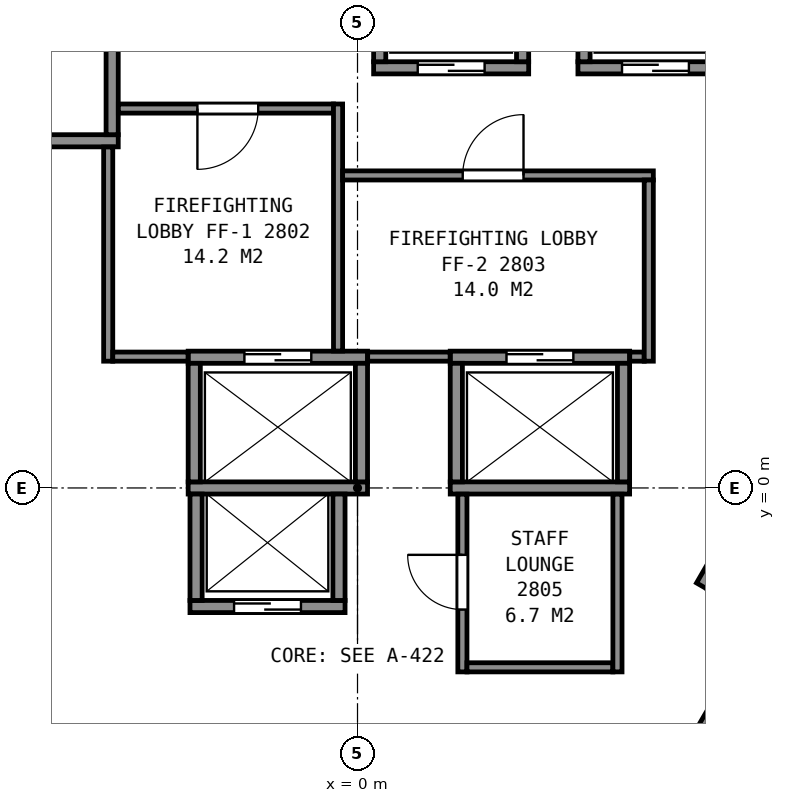
"""IFC4 building model, lengths in metres.
Left out: names, types, materials, properties, quantities, classifications, styles, units other than length and angle.
Written with IfcOpenShell. Run it as: python <this file> out.ifc"""

import sys

from ifc_helpers import new_model, si_unit, direction, frame, frame_2d, origin, place, context, subcontext, project, spatial, rectangle, extrude, element, fill, save


model = new_model("IFC4")
c1 = context("Model", 3, precision=1e-05, world=origin(), true_north=direction((0.0, 1.0)))
c2 = subcontext(c1, "Body", "Model", "MODEL_VIEW")
j1 = project(units=[si_unit("LENGTHUNIT", "METRE"), si_unit("PLANEANGLEUNIT", "RADIAN")], contexts=[c1])
p1 = place(None, origin())
s1 = spatial("IfcSite", under=j1, at=p1, CompositionType="ELEMENT")
p2 = place(p1, origin())
s2 = spatial("IfcBuilding", under=s1, at=p2, CompositionType="ELEMENT")
p3 = place(p2, frame((0.0, 0.0, 118.0)))
s3 = spatial("IfcBuildingStorey", under=s2, at=p3, CompositionType="ELEMENT", Elevation=118.0)
p4 = place(p3, frame((-2.755, -1.95, 0.0), z_axis=(0.0, 0.0, 1.0), x_axis=(1.0, 0.0, 0.0)))
e1 = element("IfcWall", 1, at=p4, inside=s3, PredefinedType="PARTITIONING", context=c2, shape_type="SweptSolid", body=[
    extrude(rectangle(XDim=2.55, YDim=0.2, at=frame_2d((1.275, 0.0))), origin(), (0.0, 0.0, 1.0), 3.6),
])
p5 = place(p4, frame((0.725, 0.0, 0.0)))
e2 = element("IfcOpeningElement", 2, at=p5, cuts=e1, PredefinedType="OPENING", context=c2, shape_type="SweptSolid", body=[
    extrude(rectangle(XDim=1.1, YDim=2.1, at=frame_2d((0.55, 1.05))), frame((0.0, 0.11, 0.0), z_axis=(0.0, -1.0, 0.0), x_axis=(1.0, 0.0, 0.0)), (0.0, 0.0, 1.0), 0.22),
])
p6 = place(p3, frame((-2.785, 0.0, 0.0), z_axis=(0.0, 0.0, 1.0), x_axis=(1.0, 0.0, 0.0)))
e3 = element("IfcWall", 3, at=p6, inside=s3, PredefinedType="PARTITIONING", context=c2, shape_type="SweptSolid", body=[
    extrude(rectangle(XDim=2.95, YDim=0.2, at=frame_2d((1.475, 0.0))), origin(), (0.0, 0.0, 1.0), 3.6),
])
p7 = place(p3, frame((1.525, 0.0, 0.0), z_axis=(0.0, 0.0, 1.0), x_axis=(1.0, 0.0, 0.0)))
e4 = element("IfcWall", 4, at=p7, inside=s3, PredefinedType="PARTITIONING", context=c2, shape_type="SweptSolid", body=[
    extrude(rectangle(XDim=2.95, YDim=0.2, at=frame_2d((1.475, 0.0))), origin(), (0.0, 0.0, 1.0), 3.6),
])
p8 = place(p3, frame((-2.785, 2.15, 0.0), z_axis=(0.0, 0.0, 1.0), x_axis=(1.0, 0.0, 0.0)))
e5 = element("IfcWall", 5, at=p8, inside=s3, PredefinedType="PARTITIONING", context=c2, shape_type="SweptSolid", body=[
    extrude(rectangle(XDim=2.95, YDim=0.2, at=frame_2d((1.475, 0.0))), origin(), (0.0, 0.0, 1.0), 3.6),
])
p9 = place(p8, frame((0.925, 0.0, 0.0)))
e6 = element("IfcOpeningElement", 6, at=p9, cuts=e5, PredefinedType="OPENING", context=c2, shape_type="SweptSolid", body=[
    extrude(rectangle(XDim=1.1, YDim=2.1, at=frame_2d((0.55, 1.05))), frame((0.0, 0.11, 0.0), z_axis=(0.0, -1.0, 0.0), x_axis=(1.0, 0.0, 0.0)), (0.0, 0.0, 1.0), 0.22),
])
p10 = place(p3, frame((1.525, 2.15, 0.0), z_axis=(0.0, 0.0, 1.0), x_axis=(1.0, 0.0, 0.0)))
e7 = element("IfcWall", 7, at=p10, inside=s3, PredefinedType="PARTITIONING", context=c2, shape_type="SweptSolid", body=[
    extrude(rectangle(XDim=2.95, YDim=0.2, at=frame_2d((1.475, 0.0))), origin(), (0.0, 0.0, 1.0), 3.6),
])
p11 = place(p10, frame((0.925, 0.0, 0.0)))
e8 = element("IfcOpeningElement", 8, at=p11, cuts=e7, PredefinedType="OPENING", context=c2, shape_type="SweptSolid", body=[
    extrude(rectangle(XDim=1.1, YDim=2.1, at=frame_2d((0.55, 1.05))), frame((0.0, 0.11, 0.0), z_axis=(0.0, -1.0, 0.0), x_axis=(1.0, 0.0, 0.0)), (0.0, 0.0, 1.0), 0.22),
])
p12 = place(p3, frame((-6.285, 5.71, 0.0), z_axis=(0.0, 0.0, 1.0), x_axis=(1.0, 0.0, 0.0)))
e9 = element("IfcWall", 9, at=p12, inside=s3, PredefinedType="PARTITIONING", context=c2, shape_type="SweptSolid", body=[
    extrude(rectangle(XDim=2.35, YDim=0.2, at=frame_2d((1.175, 0.0))), origin(), (0.0, 0.0, 1.0), 3.6),
])
p13 = place(p3, frame((0.265, 6.91, 0.0), z_axis=(0.0, 0.0, 1.0), x_axis=(1.0, 0.0, 0.0)))
e10 = element("IfcWall", 10, at=p13, inside=s3, PredefinedType="PARTITIONING", context=c2, shape_type="SweptSolid", body=[
    extrude(rectangle(XDim=2.55, YDim=0.2, at=frame_2d((1.275, 0.0))), origin(), (0.0, 0.0, 1.0), 3.6),
])
p14 = place(p13, frame((0.725, 0.0, 0.0)))
e11 = element("IfcOpeningElement", 11, at=p14, cuts=e10, PredefinedType="OPENING", context=c2, shape_type="SweptSolid", body=[
    extrude(rectangle(XDim=1.1, YDim=2.1, at=frame_2d((0.55, 1.05))), frame((0.0, 0.11, 0.0), z_axis=(0.0, -1.0, 0.0), x_axis=(1.0, 0.0, 0.0)), (0.0, 0.0, 1.0), 0.22),
])
p15 = place(p3, frame((3.625, 6.91, 0.0), z_axis=(0.0, 0.0, 1.0), x_axis=(1.0, 0.0, 0.0)))
e12 = element("IfcWall", 12, at=p15, inside=s3, PredefinedType="PARTITIONING", context=c2, shape_type="SweptSolid", body=[
    extrude(rectangle(XDim=2.55, YDim=0.2, at=frame_2d((1.275, 0.0))), origin(), (0.0, 0.0, 1.0), 3.6),
])
p16 = place(p15, frame((0.725, 0.0, 0.0)))
e13 = element("IfcOpeningElement", 13, at=p16, cuts=e12, PredefinedType="OPENING", context=c2, shape_type="SweptSolid", body=[
    extrude(rectangle(XDim=1.1, YDim=2.1, at=frame_2d((0.55, 1.05))), frame((0.0, 0.11, 0.0), z_axis=(0.0, -1.0, 0.0), x_axis=(1.0, 0.0, 0.0)), (0.0, 0.0, 1.0), 0.22),
])
p17 = place(p3, frame((5.527, -4.247, 0.0), z_axis=(0.0, 0.0, 1.0), x_axis=(0.499938297808, 0.866061024631, 0.0)))
e14 = element("IfcWall", 14, at=p17, inside=s3, PredefinedType="PARTITIONING", context=c2, shape_type="SweptSolid", body=[
    extrude(rectangle(XDim=2.35, YDim=0.2, at=frame_2d((1.175, 0.0))), origin(), (0.0, 0.0, 1.0), 3.6),
])
p18 = place(p17, frame((0.725, 0.0, 0.0)))
e15 = element("IfcOpeningElement", 15, at=p18, cuts=e14, PredefinedType="OPENING", context=c2, shape_type="SweptSolid", body=[
    extrude(rectangle(XDim=1.1, YDim=2.1, at=frame_2d((0.55, 1.05))), frame((0.0, 0.11, 0.0), z_axis=(0.0, -1.0, 0.0), x_axis=(1.0, 0.0, 0.0)), (0.0, 0.0, 1.0), 0.22),
])
p19 = place(p3, frame((5.663, -1.612, 0.0), z_axis=(0.0, 0.0, 1.0), x_axis=(0.49998122708, 0.866036242063, 0.0)))
e16 = element("IfcWall", 16, at=p19, inside=s3, PredefinedType="PARTITIONING", context=c2, shape_type="SweptSolid", body=[
    extrude(rectangle(XDim=4.9, YDim=0.2, at=frame_2d((2.45, 0.0))), origin(), (0.0, 0.0, 1.0), 3.6),
])
p20 = place(p3, frame((4.375, 0.1, 0.0), z_axis=(0.0, 0.0, 1.0), x_axis=(0.0, 1.0, 0.0)))
e17 = element("IfcWall", 17, at=p20, inside=s3, PredefinedType="PARTITIONING", context=c2, shape_type="SweptSolid", body=[
    extrude(rectangle(XDim=1.95, YDim=0.2, at=frame_2d((0.975, 0.0))), origin(), (0.0, 0.0, 1.0), 3.6),
])
for number, where, z_axis, x_axis in (
    (18, (3.725, 7.01, 0.0), (0.0, 0.0, 1.0), (0.0, 1.0, 0.0)),
    (19, (2.715, 7.01, 0.0), (0.0, 0.0, 1.0), (0.0, 1.0, 0.0)),
):
    element("IfcWall", number, at=place(p3, frame(where, z_axis=z_axis, x_axis=x_axis)), inside=s3, PredefinedType="PARTITIONING", context=c2, shape_type="SweptSolid", body=[
        extrude(rectangle(XDim=1.75, YDim=0.2, at=frame_2d((0.875, 0.0))), origin(), (0.0, 0.0, 1.0), 3.6),
    ])
p21 = place(p3, frame((1.625, 0.1, 0.0), z_axis=(0.0, 0.0, 1.0), x_axis=(0.0, 1.0, 0.0)))
e20 = element("IfcWall", 20, at=p21, inside=s3, PredefinedType="PARTITIONING", context=c2, shape_type="SweptSolid", body=[
    extrude(rectangle(XDim=1.95, YDim=0.2, at=frame_2d((0.975, 0.0))), origin(), (0.0, 0.0, 1.0), 3.6),
])
p22 = place(p3, frame((0.365, 7.01, 0.0), z_axis=(0.0, 0.0, 1.0), x_axis=(0.0, 1.0, 0.0)))
e21 = element("IfcWall", 21, at=p22, inside=s3, PredefinedType="PARTITIONING", context=c2, shape_type="SweptSolid", body=[
    extrude(rectangle(XDim=1.75, YDim=0.2, at=frame_2d((0.875, 0.0))), origin(), (0.0, 0.0, 1.0), 3.6),
])
p23 = place(p3, frame((0.065, 0.1, 0.0), z_axis=(0.0, 0.0, 1.0), x_axis=(0.0, 1.0, 0.0)))
e22 = element("IfcWall", 22, at=p23, inside=s3, PredefinedType="PARTITIONING", context=c2, shape_type="SweptSolid", body=[
    extrude(rectangle(XDim=1.95, YDim=0.2, at=frame_2d((0.975, 0.0))), origin(), (0.0, 0.0, 1.0), 3.6),
])
for number, where, z_axis, x_axis in (
    (23, (-0.305, -1.85, 0.0), (0.0, 0.0, 1.0), (0.0, 1.0, 0.0)),
    (24, (-2.655, -1.85, 0.0), (0.0, 0.0, 1.0), (0.0, 1.0, 0.0)),
):
    element("IfcWall", number, at=place(p3, frame(where, z_axis=z_axis, x_axis=x_axis)), inside=s3, PredefinedType="PARTITIONING", context=c2, shape_type="SweptSolid", body=[
        extrude(rectangle(XDim=1.75, YDim=0.2, at=frame_2d((0.875, 0.0))), origin(), (0.0, 0.0, 1.0), 3.6),
    ])
p24 = place(p3, frame((-2.685, 0.1, 0.0), z_axis=(0.0, 0.0, 1.0), x_axis=(0.0, 1.0, 0.0)))
e25 = element("IfcWall", 25, at=p24, inside=s3, PredefinedType="PARTITIONING", context=c2, shape_type="SweptSolid", body=[
    extrude(rectangle(XDim=1.95, YDim=0.2, at=frame_2d((0.975, 0.0))), origin(), (0.0, 0.0, 1.0), 3.6),
])
p25 = place(p3, frame((-4.035, 5.81, 0.0), z_axis=(0.0, 0.0, 1.0), x_axis=(0.0, 1.0, 0.0)))
e26 = element("IfcWall", 26, at=p25, inside=s3, PredefinedType="PARTITIONING", context=c2, shape_type="SweptSolid", body=[
    extrude(rectangle(XDim=1.75, YDim=0.2, at=frame_2d((0.875, 0.0))), origin(), (0.0, 0.0, 1.0), 3.6),
])
p26 = place(p3, frame((-13.664, 5.946, 0.0), z_axis=(0.0, 0.0, 1.0), x_axis=(0.499994327219, -0.866028678941, 0.0)))
e27 = element("IfcWall", 27, at=p26, inside=s3, PredefinedType="PARTITIONING", context=c2, shape_type="SweptSolid", body=[
    extrude(rectangle(XDim=23.968, YDim=0.2, at=frame_2d((11.984, 0.0))), origin(), (0.0, 0.0, 1.0), 3.35),
])
p27 = place(p3, frame((-4.152, -5.729, 0.0), z_axis=(0.0, 0.0, 1.0), x_axis=(-0.500024287448, 0.866011380966, 0.0)))
e28 = element("IfcWall", 28, at=p27, inside=s3, PredefinedType="PARTITIONING", context=c2, shape_type="SweptSolid", body=[
    extrude(rectangle(XDim=3.501, YDim=0.15, at=frame_2d((1.75, 0.0))), origin(), (0.0, 0.0, 1.0), 3.35),
])
p28 = place(p27, frame((2.026, 0.0, 0.0)))
e29 = element("IfcOpeningElement", 29, at=p28, cuts=e28, PredefinedType="OPENING", context=c2, shape_type="SweptSolid", body=[
    extrude(rectangle(XDim=0.9, YDim=2.1, at=frame_2d((0.45, 1.05))), frame((0.0, 0.085, 0.0), z_axis=(0.0, -1.0, 0.0), x_axis=(1.0, 0.0, 0.0)), (0.0, 0.0, 1.0), 0.17),
])
p29 = place(p27, frame((0.248, 0.0, 0.0)))
e30 = element("IfcOpeningElement", 30, at=p29, cuts=e28, PredefinedType="OPENING", context=c2, shape_type="SweptSolid", body=[
    extrude(rectangle(XDim=0.9, YDim=2.1, at=frame_2d((0.45, 1.05))), frame((0.0, 0.085, 0.0), z_axis=(0.0, -1.0, 0.0), x_axis=(1.0, 0.0, 0.0)), (0.0, 0.0, 1.0), 0.17),
])
p30 = place(p3, frame((-4.1, 2.085, 0.0), z_axis=(0.0, 0.0, 1.0), x_axis=(0.0, 1.0, 0.0)))
e31 = element("IfcWall", 31, at=p30, inside=s3, PredefinedType="PARTITIONING", context=c2, shape_type="SweptSolid", body=[
    extrude(rectangle(XDim=3.523, YDim=0.15, at=frame_2d((1.761, 0.0))), origin(), (0.0, 0.0, 1.0), 3.35),
])
p31 = place(p3, frame((-4.025, 2.16, 0.0), z_axis=(0.0, 0.0, 1.0), x_axis=(1.0, 0.0, 0.0)))
e32 = element("IfcWall", 32, at=p31, inside=s3, PredefinedType="PARTITIONING", context=c2, shape_type="SweptSolid", body=[
    extrude(rectangle(XDim=1.238, YDim=0.15, at=frame_2d((0.619, 0.0))), origin(), (0.0, 0.0, 1.0), 3.35),
])
p32 = place(p3, frame((-3.933, 6.24, 0.0), z_axis=(0.0, 0.0, 1.0), x_axis=(1.0, 0.0, 0.0)))
e33 = element("IfcWall", 33, at=p32, inside=s3, PredefinedType="PARTITIONING", context=c2, shape_type="SweptSolid", body=[
    extrude(rectangle(XDim=3.538, YDim=0.15, at=frame_2d((1.769, 0.0))), origin(), (0.0, 0.0, 1.0), 3.35),
])
p33 = place(p32, frame((1.3, 0.0, 0.0)))
e34 = element("IfcOpeningElement", 34, at=p33, cuts=e33, PredefinedType="OPENING", context=c2, shape_type="SweptSolid", body=[
    extrude(rectangle(XDim=1.0, YDim=2.1, at=frame_2d((0.5, 1.05))), frame((0.0, 0.085, 0.0), z_axis=(0.0, -1.0, 0.0), x_axis=(1.0, 0.0, 0.0)), (0.0, 0.0, 1.0), 0.17),
])
p34 = place(p3, frame((-0.32, 2.252, 0.0), z_axis=(0.0, 0.0, 1.0), x_axis=(0.0, 1.0, 0.0)))
e35 = element("IfcWall", 35, at=p34, inside=s3, PredefinedType="PARTITIONING", context=c2, shape_type="SweptSolid", body=[
    extrude(rectangle(XDim=4.063, YDim=0.15, at=frame_2d((2.031, 0.0))), origin(), (0.0, 0.0, 1.0), 3.35),
])
p35 = place(p3, frame((-0.245, 5.14, 0.0), z_axis=(0.0, 0.0, 1.0), x_axis=(1.0, 0.0, 0.0)))
e36 = element("IfcWall", 36, at=p35, inside=s3, PredefinedType="PARTITIONING", context=c2, shape_type="SweptSolid", body=[
    extrude(rectangle(XDim=5.11, YDim=0.15, at=frame_2d((2.555, 0.0))), origin(), (0.0, 0.0, 1.0), 3.35),
])
p36 = place(p35, frame((1.975, 0.0, 0.0)))
e37 = element("IfcOpeningElement", 37, at=p36, cuts=e36, PredefinedType="OPENING", context=c2, shape_type="SweptSolid", body=[
    extrude(rectangle(XDim=1.0, YDim=2.1, at=frame_2d((0.5, 1.05))), frame((0.0, 0.085, 0.0), z_axis=(0.0, -1.0, 0.0), x_axis=(1.0, 0.0, 0.0)), (0.0, 0.0, 1.0), 0.17),
])
p37 = place(p3, frame((0.167, 2.16, 0.0), z_axis=(0.0, 0.0, 1.0), x_axis=(1.0, 0.0, 0.0)))
e38 = element("IfcWall", 38, at=p37, inside=s3, PredefinedType="PARTITIONING", context=c2, shape_type="SweptSolid", body=[
    extrude(rectangle(XDim=1.356, YDim=0.15, at=frame_2d((0.678, 0.0))), origin(), (0.0, 0.0, 1.0), 3.35),
])
p38 = place(p3, frame((1.725, -0.102, 0.0), z_axis=(0.0, 0.0, 1.0), x_axis=(0.0, -1.0, 0.0)))
e39 = element("IfcWall", 39, at=p38, inside=s3, PredefinedType="PARTITIONING", context=c2, shape_type="SweptSolid", body=[
    extrude(rectangle(XDim=2.923, YDim=0.15, at=frame_2d((1.461, 0.0))), origin(), (0.0, 0.0, 1.0), 3.35),
])
p39 = place(p38, frame((0.998, 0.0, 0.0)))
e40 = element("IfcOpeningElement", 40, at=p39, cuts=e39, PredefinedType="OPENING", context=c2, shape_type="SweptSolid", body=[
    extrude(rectangle(XDim=0.9, YDim=2.1, at=frame_2d((0.45, 1.05))), frame((0.0, 0.085, 0.0), z_axis=(0.0, -1.0, 0.0), x_axis=(1.0, 0.0, 0.0)), (0.0, 0.0, 1.0), 0.17),
])
p40 = place(p3, frame((1.8, -2.95, 0.0), z_axis=(0.0, 0.0, 1.0), x_axis=(1.0, 0.0, 0.0)))
e41 = element("IfcWall", 41, at=p40, inside=s3, PredefinedType="PARTITIONING", context=c2, shape_type="SweptSolid", body=[
    extrude(rectangle(XDim=2.4, YDim=0.15, at=frame_2d((1.2, 0.0))), origin(), (0.0, 0.0, 1.0), 3.35),
])
p41 = place(p3, frame((4.275, -3.025, 0.0), z_axis=(0.0, 0.0, 1.0), x_axis=(0.0, 1.0, 0.0)))
e42 = element("IfcWall", 42, at=p41, inside=s3, PredefinedType="PARTITIONING", context=c2, shape_type="SweptSolid", body=[
    extrude(rectangle(XDim=2.923, YDim=0.15, at=frame_2d((1.461, 0.0))), origin(), (0.0, 0.0, 1.0), 3.35),
])
p42 = place(p3, frame((4.477, 2.16, 0.0), z_axis=(0.0, 0.0, 1.0), x_axis=(1.0, 0.0, 0.0)))
e43 = element("IfcWall", 43, at=p42, inside=s3, PredefinedType="PARTITIONING", context=c2, shape_type="SweptSolid", body=[
    extrude(rectangle(XDim=0.238, YDim=0.15, at=frame_2d((0.119, 0.0))), origin(), (0.0, 0.0, 1.0), 3.35),
])
p43 = place(p3, frame((4.79, 2.085, 0.0), z_axis=(0.0, 0.0, 1.0), x_axis=(0.0, 1.0, 0.0)))
e44 = element("IfcWall", 44, at=p43, inside=s3, PredefinedType="PARTITIONING", context=c2, shape_type="SweptSolid", body=[
    extrude(rectangle(XDim=2.98, YDim=0.15, at=frame_2d((1.49, 0.0))), origin(), (0.0, 0.0, 1.0), 3.35),
])
p44 = place(p3, frame((-3.756, -15.494, 0.0), z_axis=(0.0, 0.0, 1.0), x_axis=(-0.500027787016, 0.866009360349, 0.0)))
e45 = element("IfcWall", 45, at=p44, inside=s3, PredefinedType="PARTITIONING", context=c2, shape_type="SweptSolid", body=[
    extrude(rectangle(XDim=23.856, YDim=0.125, at=frame_2d((11.928, 0.0))), origin(), (0.0, 0.0, 1.0), 2.613),
])
p45 = place(p44, frame((22.393, 0.0, 0.0)))
e46 = element("IfcOpeningElement", 46, at=p45, cuts=e45, PredefinedType="OPENING", context=c2, shape_type="SweptSolid", body=[
    extrude(rectangle(XDim=1.0, YDim=2.1, at=frame_2d((0.5, 1.05))), frame((0.0, 0.073, 0.0), z_axis=(0.0, -1.0, 0.0), x_axis=(1.0, 0.0, 0.0)), (0.0, 0.0, 1.0), 0.145),
])
p46 = place(p44, frame((12.996, 0.0, 0.0)))
e47 = element("IfcOpeningElement", 47, at=p46, cuts=e45, PredefinedType="OPENING", context=c2, shape_type="SweptSolid", body=[
    extrude(rectangle(XDim=0.9, YDim=2.1, at=frame_2d((0.45, 1.05))), frame((0.0, 0.073, 0.0), z_axis=(0.0, -1.0, 0.0), x_axis=(1.0, 0.0, 0.0)), (0.0, 0.0, 1.0), 0.145),
])
p47 = place(p44, frame((9.011, 0.0, 0.0)))
e48 = element("IfcOpeningElement", 48, at=p47, cuts=e45, PredefinedType="OPENING", context=c2, shape_type="SweptSolid", body=[
    extrude(rectangle(XDim=1.0, YDim=2.1, at=frame_2d((0.5, 1.05))), frame((0.0, 0.073, 0.0), z_axis=(0.0, -1.0, 0.0), x_axis=(1.0, 0.0, 0.0)), (0.0, 0.0, 1.0), 0.145),
])
p48 = place(p3, frame((15.684, 5.165, 0.0), z_axis=(0.0, 0.0, 1.0), x_axis=(-0.500027787016, -0.866009360349, 0.0)))
e49 = element("IfcWall", 49, at=p48, inside=s3, PredefinedType="PARTITIONING", context=c2, shape_type="SweptSolid", body=[
    extrude(rectangle(XDim=23.856, YDim=0.125, at=frame_2d((11.928, 0.0))), origin(), (0.0, 0.0, 1.0), 2.613),
])
p49 = place(p48, frame((20.245, 0.0, 0.0)))
e50 = element("IfcOpeningElement", 50, at=p49, cuts=e49, PredefinedType="OPENING", context=c2, shape_type="SweptSolid", body=[
    extrude(rectangle(XDim=1.0, YDim=2.1, at=frame_2d((0.5, 1.05))), frame((0.0, 0.073, 0.0), z_axis=(0.0, -1.0, 0.0), x_axis=(1.0, 0.0, 0.0)), (0.0, 0.0, 1.0), 0.145),
])
p50 = place(p48, frame((16.943, 0.0, 0.0)))
e51 = element("IfcOpeningElement", 51, at=p50, cuts=e49, PredefinedType="OPENING", context=c2, shape_type="SweptSolid", body=[
    extrude(rectangle(XDim=1.0, YDim=2.1, at=frame_2d((0.5, 1.05))), frame((0.0, 0.073, 0.0), z_axis=(0.0, -1.0, 0.0), x_axis=(1.0, 0.0, 0.0)), (0.0, 0.0, 1.0), 0.145),
])
p51 = place(p48, frame((6.227, 0.0, 0.0)))
e52 = element("IfcOpeningElement", 52, at=p51, cuts=e49, PredefinedType="OPENING", context=c2, shape_type="SweptSolid", body=[
    extrude(rectangle(XDim=1.0, YDim=2.1, at=frame_2d((0.5, 1.05))), frame((0.0, 0.073, 0.0), z_axis=(0.0, -1.0, 0.0), x_axis=(1.0, 0.0, 0.0)), (0.0, 0.0, 1.0), 0.145),
])
p52 = place(p48, frame((2.825, 0.0, 0.0)))
e53 = element("IfcOpeningElement", 53, at=p52, cuts=e49, PredefinedType="OPENING", context=c2, shape_type="SweptSolid", body=[
    extrude(rectangle(XDim=0.9, YDim=2.1, at=frame_2d((0.45, 1.05))), frame((0.0, 0.073, 0.0), z_axis=(0.0, -1.0, 0.0), x_axis=(1.0, 0.0, 0.0)), (0.0, 0.0, 1.0), 0.145),
])
p53 = place(p14, origin())
e54 = element("IfcDoor", 54, at=p53, inside=s3, OperationType="SLIDING_TO_LEFT", PredefinedType="DOOR", context=c2, shape_type="SweptSolid", body=[
    extrude(rectangle(XDim=1.1, YDim=2.1, at=frame_2d((0.55, 1.05))), frame((0.0, 0.025, 0.0), z_axis=(0.0, -1.0, 0.0), x_axis=(1.0, 0.0, 0.0)), (0.0, 0.0, 1.0), 0.05),
])
fill(e11, e54)
p54 = place(p5, origin())
e55 = element("IfcDoor", 55, at=p54, inside=s3, OperationType="SLIDING_TO_RIGHT", PredefinedType="DOOR", context=c2, shape_type="SweptSolid", body=[
    extrude(rectangle(XDim=1.1, YDim=2.1, at=frame_2d((0.55, 1.05))), frame((0.0, 0.025, 0.0), z_axis=(0.0, -1.0, 0.0), x_axis=(1.0, 0.0, 0.0)), (0.0, 0.0, 1.0), 0.05),
])
fill(e2, e55)
p55 = place(p16, origin())
e56 = element("IfcDoor", 56, at=p55, inside=s3, OperationType="SLIDING_TO_LEFT", PredefinedType="DOOR", context=c2, shape_type="SweptSolid", body=[
    extrude(rectangle(XDim=1.1, YDim=2.1, at=frame_2d((0.55, 1.05))), frame((0.0, 0.025, 0.0), z_axis=(0.0, -1.0, 0.0), x_axis=(1.0, 0.0, 0.0)), (0.0, 0.0, 1.0), 0.05),
])
fill(e13, e56)
p56 = place(p9, origin())
e57 = element("IfcDoor", 57, at=p56, inside=s3, OperationType="SLIDING_TO_LEFT", PredefinedType="DOOR", context=c2, shape_type="SweptSolid", body=[
    extrude(rectangle(XDim=1.1, YDim=2.1, at=frame_2d((0.55, 1.05))), frame((0.0, 0.025, 0.0), z_axis=(0.0, -1.0, 0.0), x_axis=(1.0, 0.0, 0.0)), (0.0, 0.0, 1.0), 0.05),
])
fill(e6, e57)
p57 = place(p11, origin())
e58 = element("IfcDoor", 58, at=p57, inside=s3, OperationType="SLIDING_TO_RIGHT", PredefinedType="DOOR", context=c2, shape_type="SweptSolid", body=[
    extrude(rectangle(XDim=1.1, YDim=2.1, at=frame_2d((0.55, 1.05))), frame((0.0, 0.025, 0.0), z_axis=(0.0, -1.0, 0.0), x_axis=(1.0, 0.0, 0.0)), (0.0, 0.0, 1.0), 0.05),
])
fill(e8, e58)
p58 = place(p33, origin())
e59 = element("IfcDoor", 59, at=p58, inside=s3, OperationType="SINGLE_SWING_LEFT", PredefinedType="DOOR", context=c2, shape_type="SweptSolid", body=[
    extrude(rectangle(XDim=1.0, YDim=2.1, at=frame_2d((0.5, 1.05))), frame((0.0, 0.025, 0.0), z_axis=(0.0, -1.0, 0.0), x_axis=(1.0, 0.0, 0.0)), (0.0, 0.0, 1.0), 0.05),
])
fill(e34, e59)
p59 = place(p36, origin())
e60 = element("IfcDoor", 60, at=p59, inside=s3, OperationType="SINGLE_SWING_RIGHT", PredefinedType="DOOR", context=c2, shape_type="SweptSolid", body=[
    extrude(rectangle(XDim=1.0, YDim=2.1, at=frame_2d((0.5, 1.05))), frame((0.0, 0.025, 0.0), z_axis=(0.0, -1.0, 0.0), x_axis=(1.0, 0.0, 0.0)), (0.0, 0.0, 1.0), 0.05),
])
fill(e37, e60)
p60 = place(p39, origin())
e61 = element("IfcDoor", 61, at=p60, inside=s3, OperationType="SINGLE_SWING_LEFT", PredefinedType="DOOR", context=c2, shape_type="SweptSolid", body=[
    extrude(rectangle(XDim=0.9, YDim=2.1, at=frame_2d((0.45, 1.05))), frame((0.0, 0.025, 0.0), z_axis=(0.0, -1.0, 0.0), x_axis=(1.0, 0.0, 0.0)), (0.0, 0.0, 1.0), 0.05),
])
fill(e40, e61)
save(model, sys.argv[1])
